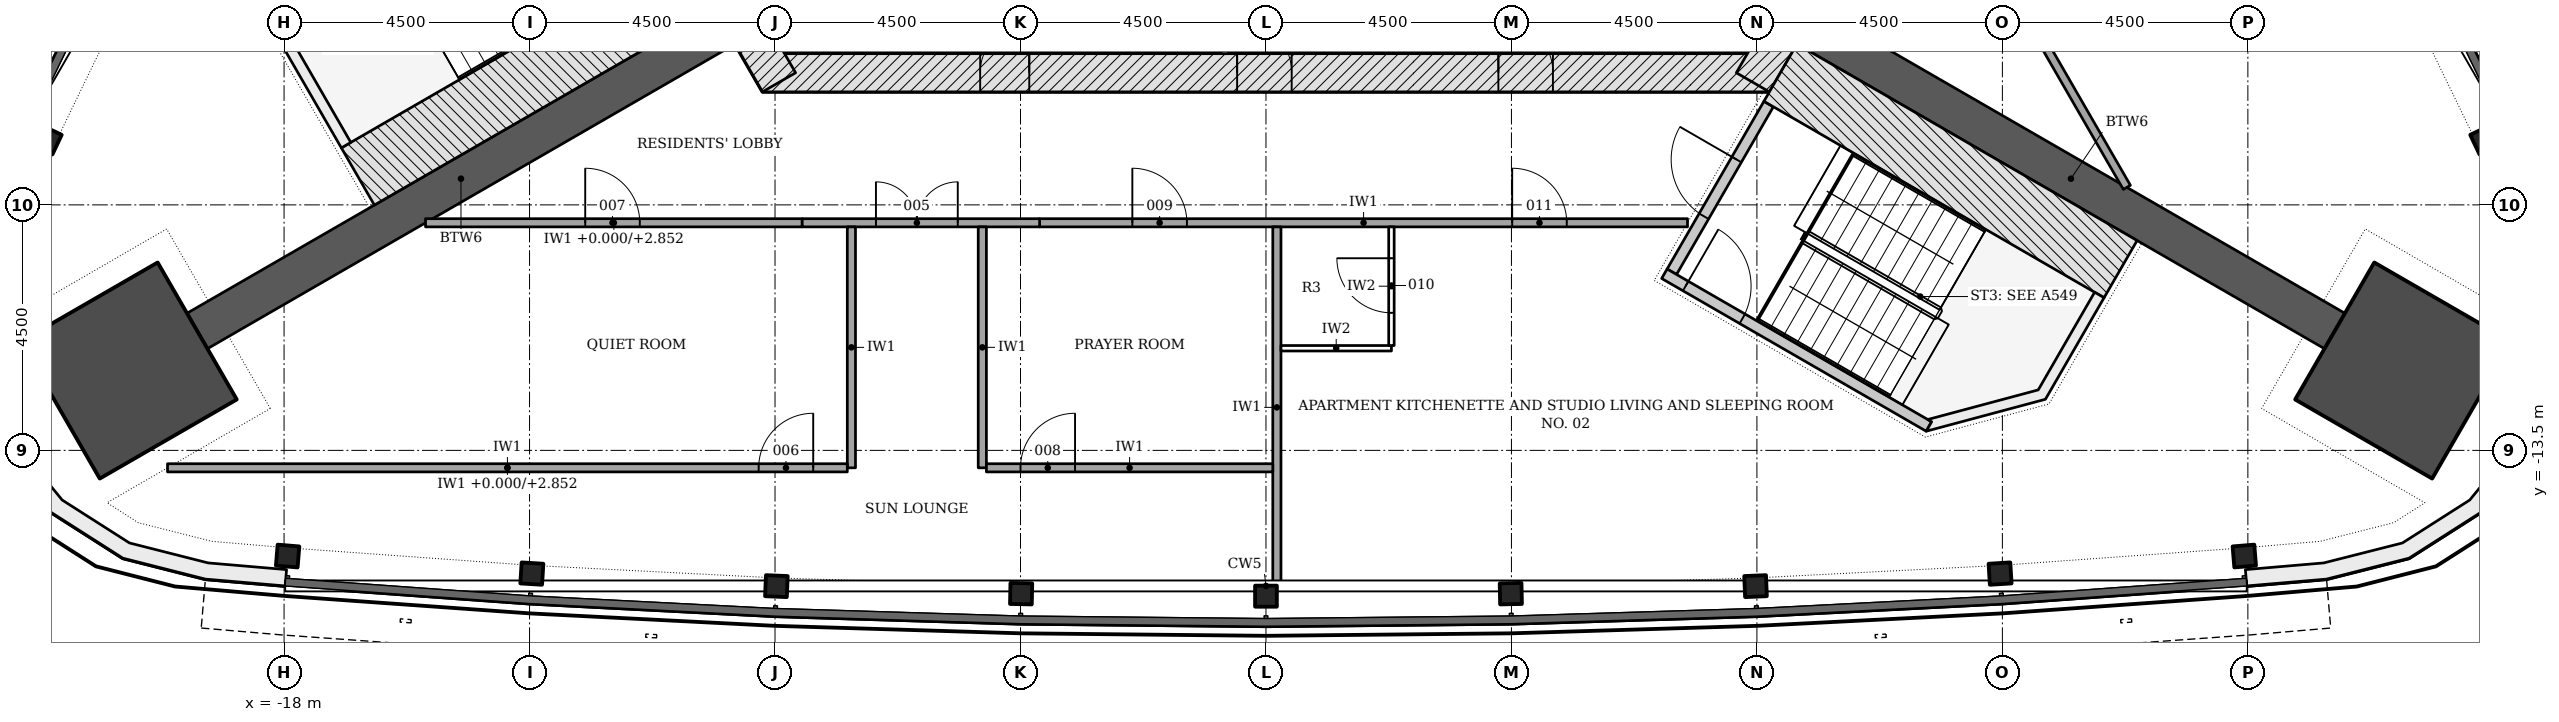
"""IFC4 building model, lengths in metres.
Left out: names, types, materials, properties, quantities, classifications, styles, units other than length and angle.
Written with IfcOpenShell. Run it as: python <this file> out.ifc"""

import sys

from ifc_helpers import new_model, si_unit, direction, frame, frame_2d, origin, origin_2d, place, context, subcontext, project, spatial, polyline, rectangle, i_section, outline, extrude, element, fill, save


model = new_model("IFC4")
c1 = context("Model", 3, precision=1e-05, world=origin(), true_north=direction((0.0, 1.0)))
c2 = subcontext(c1, "Body", "Model", "MODEL_VIEW")
j1 = project(units=[si_unit("LENGTHUNIT", "METRE"), si_unit("PLANEANGLEUNIT", "RADIAN")], contexts=[c1])
p1 = place(None, origin())
s1 = spatial("IfcSite", under=j1, at=p1, CompositionType="ELEMENT")
p2 = place(p1, origin())
s2 = spatial("IfcBuilding", under=s1, at=p2, CompositionType="ELEMENT")
p3 = place(p2, frame((0.0, 0.0, 140.1)))
s3 = spatial("IfcBuildingStorey", under=s2, at=p3, CompositionType="ELEMENT", Elevation=140.1)
p4 = place(p3, frame((-9.229, -6.578, -0.2), z_axis=(0.0, 0.0, 1.0), x_axis=(1.0, 0.0, 0.0)))
e1 = element("IfcWall", 1, at=p4, inside=s3, PredefinedType="SHEAR", context=c2, shape_type="SweptSolid", body=[
    extrude(rectangle(XDim=18.458, YDim=0.7, at=frame_2d((9.229, 0.0))), origin(), (0.0, 0.0, 1.0), 3.6),
])
p5 = place(p4, frame((8.7, 0.0, 0.2)))
e2 = element("IfcOpeningElement", 2, at=p5, cuts=e1, PredefinedType="OPENING", context=c2, shape_type="SweptSolid", body=[
    extrude(rectangle(XDim=1.0, YDim=2.1, at=frame_2d((0.5, 1.05))), frame((0.0, 0.36, 0.0), z_axis=(0.0, -1.0, 0.0), x_axis=(1.0, 0.0, 0.0)), (0.0, 0.0, 1.0), 0.72),
])
p6 = place(p4, frame((3.99, 0.0, 0.2)))
e3 = element("IfcOpeningElement", 3, at=p6, cuts=e1, PredefinedType="OPENING", context=c2, shape_type="SweptSolid", body=[
    extrude(rectangle(XDim=0.9, YDim=2.1, at=frame_2d((0.45, 1.05))), frame((0.0, 0.36, 0.0), z_axis=(0.0, -1.0, 0.0), x_axis=(1.0, 0.0, 0.0)), (0.0, 0.0, 1.0), 0.72),
])
p7 = place(p4, frame((13.489, 0.0, 0.2)))
e4 = element("IfcOpeningElement", 4, at=p7, cuts=e1, PredefinedType="OPENING", context=c2, shape_type="SweptSolid", body=[
    extrude(rectangle(XDim=1.0, YDim=2.1, at=frame_2d((0.5, 1.05))), frame((0.0, 0.36, 0.0), z_axis=(0.0, -1.0, 0.0), x_axis=(1.0, 0.0, 0.0)), (0.0, 0.0, 1.0), 0.72),
])
for number, where, z_axis, x_axis in (
    (5, (8.926, -6.753, -0.2), (0.0, 0.0, 1.0), (0.5, 0.866, 0.0)),
    (6, (-10.311, -4.353, -0.2), (0.0, 0.0, 1.0), (0.5, -0.866, 0.0)),
):
    element("IfcWall", number, at=place(p3, frame(where, z_axis=z_axis, x_axis=x_axis)), inside=s3, PredefinedType="SHEAR", context=c2, shape_type="SweptSolid", body=[
        extrude(rectangle(XDim=2.771, YDim=0.7, at=frame_2d((1.386, 0.0))), origin(), (0.0, 0.0, 1.0), 3.6),
    ])
for number, where, z_axis, x_axis in (
    (7, (-9.922, -5.728, -0.2), (0.0, 0.0, 1.0), (-0.866, -0.5, 0.0)),
    (8, (9.922, -5.728, -0.2), (0.0, 0.0, 1.0), (0.866, -0.5, 0.0)),
):
    element("IfcWall", number, at=place(p3, frame(where, z_axis=z_axis, x_axis=x_axis)), inside=s3, PredefinedType="SHEAR", context=c2, shape_type="SweptSolid", body=[
        extrude(rectangle(XDim=11.167, YDim=0.75, at=frame_2d((5.583, 0.0))), origin(), (0.0, 0.0, 1.0), 3.6),
    ])
for number, where, z_axis, x_axis in (
    (9, (-20.848, -12.037, -0.2), (0.0, 0.0, 1.0), (-0.866, -0.5, 0.0)),
    (10, (20.848, -12.037, -0.2), (0.0, 0.0, 1.0), (0.866, -0.5, 0.0)),
):
    element("IfcColumn", number, at=place(p3, frame(where, z_axis=z_axis, x_axis=x_axis)), inside=s3, PredefinedType="COLUMN", context=c2, shape_type="SweptSolid", body=[
        extrude(rectangle(XDim=2.9, YDim=2.9, at=origin_2d()), origin(), (0.0, 0.0, 1.0), 3.6),
    ])
for number, where, z_axis, x_axis in (
    (11, (-22.336, -7.814, -0.2), (0.0, 0.0, 1.0), (-0.427, -0.904, 0.0)),
    (12, (-17.935, -15.437, -0.2), (0.0, 0.0, 1.0), (0.997, -0.082, 0.0)),
    (13, (-13.458, -15.759, -0.2), (0.0, 0.0, 1.0), (0.998, -0.061, 0.0)),
    (14, (-8.975, -15.989, -0.2), (0.0, 0.0, 1.0), (0.999, -0.041, 0.0)),
    (15, (-4.489, -16.126, -0.2), (0.0, 0.0, 1.0), (1.0, -0.021, 0.0)),
    (16, (0.0, -16.173, -0.2), (0.0, 0.0, 1.0), (1.0, 0.0, 0.0)),
    (17, (4.489, -16.126, -0.2), (0.0, 0.0, 1.0), (1.0, 0.021, 0.0)),
    (18, (8.975, -15.989, -0.2), (0.0, 0.0, 1.0), (0.999, 0.041, 0.0)),
    (19, (13.458, -15.759, -0.2), (0.0, 0.0, 1.0), (0.998, 0.061, 0.0)),
    (20, (17.935, -15.437, -0.2), (0.0, 0.0, 1.0), (0.997, 0.082, 0.0)),
    (21, (22.336, -7.814, -0.2), (0.0, 0.0, 1.0), (-0.427, 0.904, 0.0)),
):
    element("IfcColumn", number, at=place(p3, frame(where, z_axis=z_axis, x_axis=x_axis)), inside=s3, PredefinedType="COLUMN", context=c2, shape_type="SweptSolid", body=[
        extrude(i_section(OverallWidth=0.399, OverallDepth=0.386, WebThickness=0.021, FlangeThickness=0.033, FilletRadius=0.015, at=origin_2d()), origin(), (0.0, 0.0, 1.0), 3.6),
    ])
p8 = place(p3, origin())
e22 = element("IfcWall", 22, at=p8, inside=s3, PredefinedType="NOTDEFINED", context=c2, shape_type="SweptSolid", body=[
    extrude(outline(polyline([(-22.833, -7.579), (-23.456, -8.907), (-23.88, -10.409), (-23.811, -11.968), (-23.255, -13.427), (-22.27, -14.636), (-20.955, -15.476), (-19.442, -15.86), (-17.98, -15.985), (-17.954, -15.686), (-19.392, -15.563), (-20.834, -15.197), (-22.068, -14.41), (-22.992, -13.275), (-23.513, -11.906), (-23.578, -10.444), (-23.174, -9.012), (-22.562, -7.706), (-22.833, -7.579)])), origin(), (0.0, 0.0, 1.0), 3.3),
])
p9 = place(p3, origin())
e23 = element("IfcWall", 23, at=p9, inside=s3, PredefinedType="NOTDEFINED", context=c2, shape_type="SweptSolid", body=[
    extrude(outline(polyline([(17.98, -15.985), (19.442, -15.86), (20.955, -15.476), (22.27, -14.636), (23.255, -13.427), (23.811, -11.968), (23.88, -10.409), (23.456, -8.907), (22.833, -7.579), (22.562, -7.706), (23.174, -9.012), (23.578, -10.444), (23.513, -11.906), (22.992, -13.275), (22.068, -14.41), (20.834, -15.197), (19.392, -15.563), (17.954, -15.686), (17.98, -15.985)])), origin(), (0.0, 0.0, 1.0), 3.3),
])
p10 = place(p3, frame((-0.754, 5.772, 0.0), z_axis=(0.0, 0.0, 1.0), x_axis=(0.0, -1.0, 0.0)))
e24 = element("IfcWall", 24, at=p10, inside=s3, PredefinedType="PARTITIONING", context=c2, shape_type="SweptSolid", body=[
    extrude(rectangle(XDim=12.0, YDim=0.15, at=frame_2d((6.0, 0.0))), origin(), (0.0, 0.0, 1.0), 3.4),
])
p11 = place(p10, frame((4.051, 0.0, 0.0)))
e25 = element("IfcOpeningElement", 25, at=p11, cuts=e24, PredefinedType="OPENING", context=c2, shape_type="SweptSolid", body=[
    extrude(rectangle(XDim=0.9, YDim=2.1, at=frame_2d((0.45, 1.05))), frame((0.0, 0.085, 0.0), z_axis=(0.0, -1.0, 0.0), x_axis=(1.0, 0.0, 0.0)), (0.0, 0.0, 1.0), 0.17),
])
p12 = place(p3, frame((-10.412, -4.879, -0.2), z_axis=(0.0, 0.0, 1.0), x_axis=(-0.866026919366, -0.499997374926, 0.0)))
e26 = element("IfcWall", 26, at=p12, inside=s3, PredefinedType="SHEAR", context=c2, shape_type="SweptSolid", body=[
    extrude(rectangle(XDim=7.2, YDim=1.211, at=frame_2d((3.6, 0.0))), origin(), (0.0, 0.0, 1.0), 3.6),
])
p13 = place(p3, frame((0.0, 0.0, -0.2)))
e27 = element("IfcWall", 27, at=p13, inside=s3, PredefinedType="SHEAR", context=c2, shape_type="SweptSolid", body=[
    extrude(outline(polyline([(-17.439, -3.907), (-18.025, -6.093), (-16.95, -7.955), (-16.777, -7.855), (-17.81, -6.065), (-17.267, -4.039), (-17.339, -4.081), (-17.339, -4.081), (-17.339, -4.081), (-17.339, -4.081), (-17.339, -4.081), (-17.339, -4.081), (-17.339, -4.081), (-17.339, -4.081), (-17.339, -4.081), (-17.339, -4.081), (-17.339, -4.081), (-17.339, -4.081), (-17.339, -4.081), (-17.339, -4.081), (-17.339, -4.081), (-17.339, -4.081), (-17.339, -4.081), (-17.439, -3.907)])), origin(), (0.0, 0.0, 1.0), 3.6),
])
p14 = place(p3, frame((7.44, -10.226, -0.2), z_axis=(0.0, 0.0, 1.0), x_axis=(0.500022077904, 0.866012656725, 0.0)))
e28 = element("IfcWall", 28, at=p14, inside=s3, PredefinedType="SHEAR", context=c2, shape_type="SweptSolid", body=[
    extrude(rectangle(XDim=3.55, YDim=0.2, at=frame_2d((1.775, 0.0))), origin(), (0.0, 0.0, 1.0), 3.6),
])
p15 = place(p14, frame((1.175, 0.0, 0.2)))
e29 = element("IfcOpeningElement", 29, at=p15, cuts=e28, PredefinedType="OPENING", context=c2, shape_type="SweptSolid", body=[
    extrude(rectangle(XDim=1.2, YDim=2.1, at=frame_2d((0.6, 1.05))), frame((0.0, 0.11, 0.0), z_axis=(0.0, -1.0, 0.0), x_axis=(1.0, 0.0, 0.0)), (0.0, 0.0, 1.0), 0.22),
])
p16 = place(p3, frame((7.304, -10.262, -0.2), z_axis=(0.0, 0.0, 1.0), x_axis=(0.866026594901, -0.49999793692, 0.0)))
e30 = element("IfcWall", 30, at=p16, inside=s3, PredefinedType="SHEAR", context=c2, shape_type="SweptSolid", body=[
    extrude(rectangle(XDim=5.6, YDim=0.2, at=frame_2d((2.8, 0.0))), origin(), (0.0, 0.0, 1.0), 3.6),
])
p17 = place(p16, frame((0.45, 0.0, 0.2)))
e31 = element("IfcOpeningElement", 31, at=p17, cuts=e30, PredefinedType="OPENING", context=c2, shape_type="SweptSolid", body=[
    extrude(rectangle(XDim=1.2, YDim=2.1, at=frame_2d((0.6, 1.05))), frame((0.0, 0.11, 0.0), z_axis=(0.0, -1.0, 0.0), x_axis=(1.0, 0.0, 0.0)), (0.0, 0.0, 1.0), 0.22),
])
p18 = place(p3, frame((9.431, -6.577, -0.2), z_axis=(0.0, 0.0, 1.0), x_axis=(0.866018442252, -0.500012057535, 0.0)))
e32 = element("IfcWall", 32, at=p18, inside=s3, PredefinedType="SHEAR", context=c2, shape_type="SweptSolid", body=[
    extrude(rectangle(XDim=7.2, YDim=1.211, at=frame_2d((3.6, 0.0))), origin(), (0.0, 0.0, 1.0), 3.6),
])
p19 = place(p3, frame((0.0, 0.0, -0.2)))
e33 = element("IfcWall", 33, at=p19, inside=s3, PredefinedType="SHEAR", context=c2, shape_type="SweptSolid", body=[
    extrude(outline(polyline([(12.104, -13.149), (14.289, -12.563), (15.364, -10.701), (15.191, -10.601), (14.157, -12.392), (12.132, -12.934), (12.204, -12.976), (12.204, -12.976), (12.204, -12.976), (12.204, -12.976), (12.204, -12.976), (12.204, -12.976), (12.204, -12.976), (12.204, -12.976), (12.204, -12.976), (12.204, -12.976), (12.204, -12.976), (12.204, -12.976), (12.204, -12.976), (12.204, -12.976), (12.204, -12.976), (12.204, -12.976), (12.204, -12.976), (12.104, -13.149)])), origin(), (0.0, 0.0, 1.0), 3.6),
])
p20 = place(p3, frame((15.782, -8.679, 0.0), z_axis=(0.0, 0.0, 1.0), x_axis=(-0.500008408626, 0.866020549008, 0.0)))
e34 = element("IfcWall", 34, at=p20, inside=s3, PredefinedType="PARTITIONING", context=c2, shape_type="SweptSolid", body=[
    extrude(rectangle(XDim=11.258, YDim=0.15, at=frame_2d((5.629, 0.0))), origin(), (0.0, 0.0, 1.0), 2.852),
])
p21 = place(p3, frame((-15.407, -9.328, 0.0), z_axis=(0.0, 0.0, 1.0), x_axis=(1.0, 0.0, 0.0)))
e35 = element("IfcWall", 35, at=p21, inside=s3, PredefinedType="PARTITIONING", context=c2, shape_type="SweptSolid", body=[
    extrude(rectangle(XDim=6.906, YDim=0.15, at=frame_2d((3.453, 0.0))), origin(), (0.0, 0.0, 1.0), 2.852),
])
p22 = place(p21, frame((2.928, 0.0, 0.0)))
e36 = element("IfcOpeningElement", 36, at=p22, cuts=e35, PredefinedType="OPENING", context=c2, shape_type="SweptSolid", body=[
    extrude(rectangle(XDim=1.0, YDim=2.1, at=frame_2d((0.5, 1.05))), frame((0.0, 0.085, 0.0), z_axis=(0.0, -1.0, 0.0), x_axis=(1.0, 0.0, 0.0)), (0.0, 0.0, 1.0), 0.17),
])
p23 = place(p3, frame((-4.149, -9.328, 0.0), z_axis=(0.0, 0.0, 1.0), x_axis=(1.0, 0.0, 0.0)))
e37 = element("IfcWall", 37, at=p23, inside=s3, PredefinedType="PARTITIONING", context=c2, shape_type="SweptSolid", body=[
    extrude(rectangle(XDim=11.876, YDim=0.15, at=frame_2d((5.938, 0.0))), origin(), (0.0, 0.0, 1.0), 2.847),
])
p24 = place(p23, frame((1.699, 0.0, 0.0)))
e38 = element("IfcOpeningElement", 38, at=p24, cuts=e37, PredefinedType="OPENING", context=c2, shape_type="SweptSolid", body=[
    extrude(rectangle(XDim=1.0, YDim=2.1, at=frame_2d((0.5, 1.05))), frame((0.0, 0.085, 0.0), z_axis=(0.0, -1.0, 0.0), x_axis=(1.0, 0.0, 0.0)), (0.0, 0.0, 1.0), 0.17),
])
p25 = place(p23, frame((8.663, 0.0, 0.0)))
e39 = element("IfcOpeningElement", 39, at=p25, cuts=e37, PredefinedType="OPENING", context=c2, shape_type="SweptSolid", body=[
    extrude(rectangle(XDim=1.0, YDim=2.1, at=frame_2d((0.5, 1.05))), frame((0.0, 0.085, 0.0), z_axis=(0.0, -1.0, 0.0), x_axis=(1.0, 0.0, 0.0)), (0.0, 0.0, 1.0), 0.17),
])
p26 = place(p3, frame((-8.501, -9.328, 0.0), z_axis=(0.0, 0.0, 1.0), x_axis=(1.0, 0.0, 0.0)))
e40 = element("IfcWall", 40, at=p26, inside=s3, PredefinedType="PARTITIONING", context=c2, shape_type="SweptSolid", body=[
    extrude(rectangle(XDim=4.353, YDim=0.15, at=frame_2d((2.176, 0.0))), origin(), (0.0, 0.0, 1.0), 2.847),
])
p27 = place(p26, frame((1.352, 0.0, 0.0)))
e41 = element("IfcOpeningElement", 41, at=p27, cuts=e40, PredefinedType="OPENING", context=c2, shape_type="SweptSolid", body=[
    extrude(rectangle(XDim=1.5, YDim=2.1, at=frame_2d((0.75, 1.05))), frame((0.0, 0.085, 0.0), z_axis=(0.0, -1.0, 0.0), x_axis=(1.0, 0.0, 0.0)), (0.0, 0.0, 1.0), 0.17),
])
p28 = place(p3, frame((0.2, -16.021, 0.0), z_axis=(0.0, 0.0, 1.0), x_axis=(0.0, 1.0, 0.0)))
e42 = element("IfcWall", 42, at=p28, inside=s3, PredefinedType="PARTITIONING", context=c2, shape_type="SweptSolid", body=[
    extrude(rectangle(XDim=6.617, YDim=0.15, at=frame_2d((3.309, 0.0))), origin(), (0.0, 0.0, 1.0), 3.4),
])
for number, where, z_axis, x_axis in (
    (43, (-7.6, -9.403, 0.0), (0.0, 0.0, 1.0), (0.0, -1.0, 0.0)),
    (44, (-5.2, -9.403, 0.0), (0.0, 0.0, 1.0), (0.0, -1.0, 0.0)),
):
    element("IfcWall", number, at=place(p3, frame(where, z_axis=z_axis, x_axis=x_axis)), inside=s3, PredefinedType="PARTITIONING", context=c2, shape_type="SweptSolid", body=[
        extrude(rectangle(XDim=4.417, YDim=0.15, at=frame_2d((2.208, 0.0))), origin(), (0.0, 0.0, 1.0), 3.4),
    ])
p29 = place(p3, frame((-20.136, -13.82, 0.0), z_axis=(0.0, 0.0, 1.0), x_axis=(1.0, 0.0, 0.0)))
e45 = element("IfcWall", 45, at=p29, inside=s3, PredefinedType="PARTITIONING", context=c2, shape_type="SweptSolid", body=[
    extrude(rectangle(XDim=12.462, YDim=0.15, at=frame_2d((6.231, 0.0))), origin(), (0.0, 0.0, 1.0), 2.852),
])
p30 = place(p29, frame((10.837, 0.0, 0.0)))
e46 = element("IfcOpeningElement", 46, at=p30, cuts=e45, PredefinedType="OPENING", context=c2, shape_type="SweptSolid", body=[
    extrude(rectangle(XDim=1.0, YDim=2.1, at=frame_2d((0.5, 1.05))), frame((0.0, 0.085, 0.0), z_axis=(0.0, -1.0, 0.0), x_axis=(1.0, 0.0, 0.0)), (0.0, 0.0, 1.0), 0.17),
])
p31 = place(p3, frame((-5.125, -13.82, 0.0), z_axis=(0.0, 0.0, 1.0), x_axis=(1.0, 0.0, 0.0)))
e47 = element("IfcWall", 47, at=p31, inside=s3, PredefinedType="PARTITIONING", context=c2, shape_type="SweptSolid", body=[
    extrude(rectangle(XDim=5.25, YDim=0.15, at=frame_2d((2.625, 0.0))), origin(), (0.0, 0.0, 1.0), 2.847),
])
p32 = place(p31, frame((0.625, 0.0, 0.0)))
e48 = element("IfcOpeningElement", 48, at=p32, cuts=e47, PredefinedType="OPENING", context=c2, shape_type="SweptSolid", body=[
    extrude(rectangle(XDim=1.0, YDim=2.1, at=frame_2d((0.5, 1.05))), frame((0.0, 0.085, 0.0), z_axis=(0.0, -1.0, 0.0), x_axis=(1.0, 0.0, 0.0)), (0.0, 0.0, 1.0), 0.17),
])
p33 = place(p3, frame((0.275, -11.628, 0.0), z_axis=(0.0, 0.0, 1.0), x_axis=(1.0, 0.0, 0.0)))
e49 = element("IfcWall", 49, at=p33, inside=s3, PredefinedType="PARTITIONING", context=c2, shape_type="SweptSolid", body=[
    extrude(rectangle(XDim=2.025, YDim=0.1, at=frame_2d((1.013, 0.0))), origin(), (0.0, 0.0, 1.0), 3.4),
])
p34 = place(p3, frame((2.3, -11.578, 0.0), z_axis=(0.0, 0.0, 1.0), x_axis=(0.0, 1.0, 0.0)))
e50 = element("IfcWall", 50, at=p34, inside=s3, PredefinedType="PARTITIONING", context=c2, shape_type="SweptSolid", body=[
    extrude(rectangle(XDim=2.175, YDim=0.1, at=frame_2d((1.087, 0.0))), origin(), (0.0, 0.0, 1.0), 3.4),
])
p35 = place(p34, frame((0.6, 0.0, 0.0)))
e51 = element("IfcOpeningElement", 51, at=p35, cuts=e50, PredefinedType="OPENING", context=c2, shape_type="SweptSolid", body=[
    extrude(rectangle(XDim=1.0, YDim=2.1, at=frame_2d((0.5, 1.05))), frame((0.0, 0.06, 0.0), z_axis=(0.0, -1.0, 0.0), x_axis=(1.0, 0.0, 0.0)), (0.0, 0.0, 1.0), 0.12),
])
p36 = place(p5, origin())
e52 = element("IfcDoor", 52, at=p36, inside=s3, OperationType="SINGLE_SWING_LEFT", PredefinedType="DOOR", context=c2, shape_type="SweptSolid", body=[
    extrude(rectangle(XDim=1.0, YDim=2.1, at=frame_2d((0.5, 1.05))), frame((0.0, 0.075, 0.0), z_axis=(0.0, -1.0, 0.0), x_axis=(1.0, 0.0, 0.0)), (0.0, 0.0, 1.0), 0.15),
])
fill(e2, e52)
p37 = place(p6, origin())
e53 = element("IfcDoor", 53, at=p37, inside=s3, OperationType="SINGLE_SWING_RIGHT", PredefinedType="DOOR", context=c2, shape_type="SweptSolid", body=[
    extrude(rectangle(XDim=0.9, YDim=2.1, at=frame_2d((0.45, 1.05))), frame((0.0, 0.075, 0.0), z_axis=(0.0, -1.0, 0.0), x_axis=(1.0, 0.0, 0.0)), (0.0, 0.0, 1.0), 0.15),
])
fill(e3, e53)
p38 = place(p7, origin())
e54 = element("IfcDoor", 54, at=p38, inside=s3, OperationType="SINGLE_SWING_LEFT", PredefinedType="DOOR", context=c2, shape_type="SweptSolid", body=[
    extrude(rectangle(XDim=1.0, YDim=2.1, at=frame_2d((0.5, 1.05))), frame((0.0, 0.075, 0.0), z_axis=(0.0, -1.0, 0.0), x_axis=(1.0, 0.0, 0.0)), (0.0, 0.0, 1.0), 0.15),
])
fill(e4, e54)
p39 = place(p15, origin())
e55 = element("IfcDoor", 55, at=p39, inside=s3, OperationType="SINGLE_SWING_RIGHT", PredefinedType="DOOR", context=c2, shape_type="SweptSolid", body=[
    extrude(rectangle(XDim=1.2, YDim=2.1, at=frame_2d((0.6, 1.05))), frame((0.0, 0.025, 0.0), z_axis=(0.0, -1.0, 0.0), x_axis=(1.0, 0.0, 0.0)), (0.0, 0.0, 1.0), 0.05),
])
fill(e29, e55)
p40 = place(p17, origin())
e56 = element("IfcDoor", 56, at=p40, inside=s3, OperationType="SINGLE_SWING_LEFT", PredefinedType="DOOR", context=c2, shape_type="SweptSolid", body=[
    extrude(rectangle(XDim=1.2, YDim=2.1, at=frame_2d((0.6, 1.05))), frame((0.0, 0.025, 0.0), z_axis=(0.0, -1.0, 0.0), x_axis=(1.0, 0.0, 0.0)), (0.0, 0.0, 1.0), 0.05),
])
fill(e31, e56)
p41 = place(p27, origin())
e57 = element("IfcDoor", 57, at=p41, inside=s3, OperationType="DOUBLE_DOOR_SINGLE_SWING", PredefinedType="DOOR", context=c2, shape_type="SweptSolid", body=[
    extrude(rectangle(XDim=1.5, YDim=2.1, at=frame_2d((0.75, 1.05))), frame((0.0, 0.025, 0.0), z_axis=(0.0, -1.0, 0.0), x_axis=(1.0, 0.0, 0.0)), (0.0, 0.0, 1.0), 0.05),
])
fill(e41, e57)
p42 = place(p30, origin())
e58 = element("IfcDoor", 58, at=p42, inside=s3, OperationType="SINGLE_SWING_RIGHT", PredefinedType="DOOR", context=c2, shape_type="SweptSolid", body=[
    extrude(rectangle(XDim=1.0, YDim=2.1, at=frame_2d((0.5, 1.05))), frame((0.0, 0.025, 0.0), z_axis=(0.0, -1.0, 0.0), x_axis=(1.0, 0.0, 0.0)), (0.0, 0.0, 1.0), 0.05),
])
fill(e46, e58)
p43 = place(p22, origin())
e59 = element("IfcDoor", 59, at=p43, inside=s3, OperationType="SINGLE_SWING_LEFT", PredefinedType="DOOR", context=c2, shape_type="SweptSolid", body=[
    extrude(rectangle(XDim=1.0, YDim=2.1, at=frame_2d((0.5, 1.05))), frame((0.0, 0.025, 0.0), z_axis=(0.0, -1.0, 0.0), x_axis=(1.0, 0.0, 0.0)), (0.0, 0.0, 1.0), 0.05),
])
fill(e36, e59)
p44 = place(p32, origin())
e60 = element("IfcDoor", 60, at=p44, inside=s3, OperationType="SINGLE_SWING_RIGHT", PredefinedType="DOOR", context=c2, shape_type="SweptSolid", body=[
    extrude(rectangle(XDim=1.0, YDim=2.1, at=frame_2d((0.5, 1.05))), frame((0.0, 0.025, 0.0), z_axis=(0.0, -1.0, 0.0), x_axis=(1.0, 0.0, 0.0)), (0.0, 0.0, 1.0), 0.05),
])
fill(e48, e60)
p45 = place(p24, origin())
e61 = element("IfcDoor", 61, at=p45, inside=s3, OperationType="SINGLE_SWING_LEFT", PredefinedType="DOOR", context=c2, shape_type="SweptSolid", body=[
    extrude(rectangle(XDim=1.0, YDim=2.1, at=frame_2d((0.5, 1.05))), frame((0.0, 0.025, 0.0), z_axis=(0.0, -1.0, 0.0), x_axis=(1.0, 0.0, 0.0)), (0.0, 0.0, 1.0), 0.05),
])
fill(e38, e61)
p46 = place(p35, origin())
e62 = element("IfcDoor", 62, at=p46, inside=s3, OperationType="SINGLE_SWING_RIGHT", PredefinedType="DOOR", context=c2, shape_type="SweptSolid", body=[
    extrude(rectangle(XDim=1.0, YDim=2.1, at=frame_2d((0.5, 1.05))), frame((0.0, 0.025, 0.0), z_axis=(0.0, -1.0, 0.0), x_axis=(1.0, 0.0, 0.0)), (0.0, 0.0, 1.0), 0.05),
])
fill(e51, e62)
p47 = place(p25, origin())
e63 = element("IfcDoor", 63, at=p47, inside=s3, OperationType="SINGLE_SWING_LEFT", PredefinedType="DOOR", context=c2, shape_type="SweptSolid", body=[
    extrude(rectangle(XDim=1.0, YDim=2.1, at=frame_2d((0.5, 1.05))), frame((0.0, 0.025, 0.0), z_axis=(0.0, -1.0, 0.0), x_axis=(1.0, 0.0, 0.0)), (0.0, 0.0, 1.0), 0.05),
])
fill(e39, e63)
save(model, sys.argv[1])
